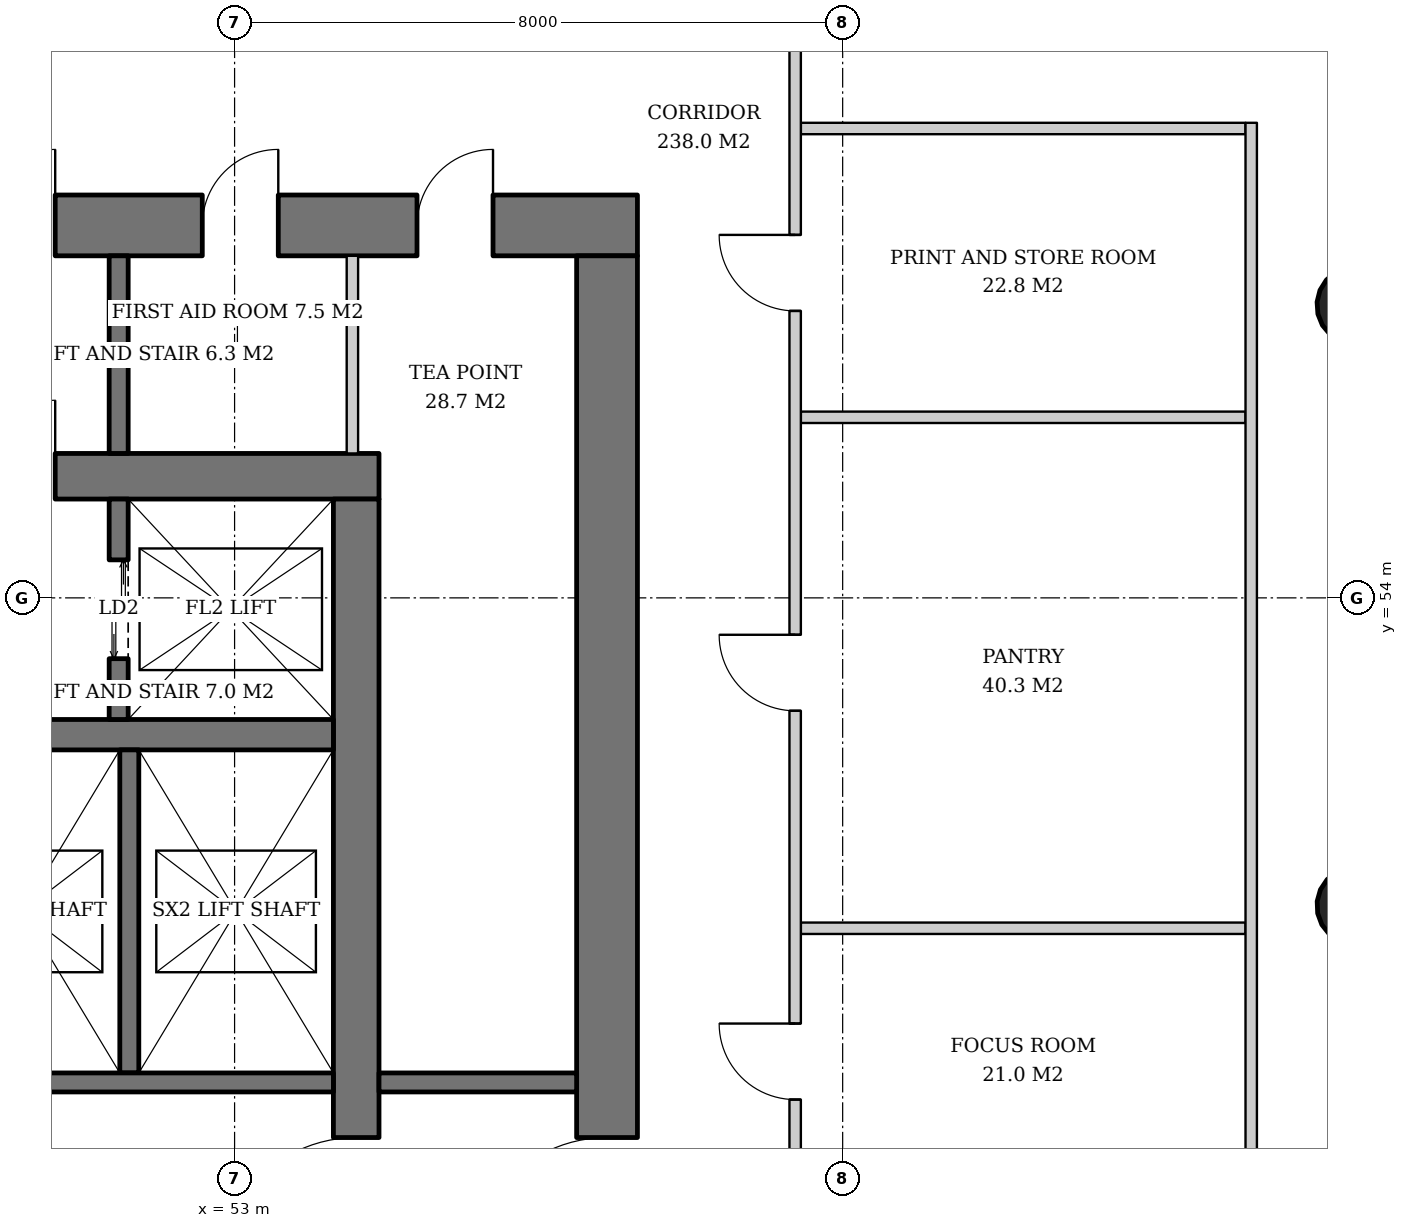
"""IFC4 building model, lengths in metres.
Left out: names, types, materials, properties, quantities, classifications, styles, units other than length and angle.
Written with IfcOpenShell. Run it as: python <this file> out.ifc"""

import sys

from ifc_helpers import new_model, si_unit, direction, frame, frame_2d, origin, origin_2d, place, context, subcontext, project, spatial, rectangle, hollow_circle, extrude, element, fill, save


model = new_model("IFC4")
c1 = context("Model", 3, precision=1e-05, world=origin(), true_north=direction((0.0, 1.0)))
c2 = subcontext(c1, "Body", "Model", "MODEL_VIEW")
j1 = project(units=[si_unit("LENGTHUNIT", "METRE"), si_unit("PLANEANGLEUNIT", "RADIAN")], contexts=[c1])
p1 = place(None, origin())
s1 = spatial("IfcSite", under=j1, at=p1, CompositionType="ELEMENT")
p2 = place(p1, origin())
s2 = spatial("IfcBuilding", under=s1, at=p2, CompositionType="ELEMENT")
p3 = place(p2, frame((0.0, 0.0, 59.0)))
s3 = spatial("IfcBuildingStorey", under=s2, at=p3, CompositionType="ELEMENT", Elevation=59.0)
p4 = place(p3, frame((67.786, 49.957, 0.0), z_axis=(-0.031913703469, -0.006357055621, 0.999470411455), x_axis=(0.195357113251, -0.980732174603, 0.0)))
e1 = element("IfcColumn", 1, at=p4, inside=s3, PredefinedType="COLUMN", context=c2, shape_type="SweptSolid", body=[
    extrude(hollow_circle(Radius=0.508, WallThickness=0.04, at=origin_2d()), origin(), (0.0, 0.0, 1.0), 3.802),
])
p5 = place(p3, frame((67.786, 57.871, 0.0), z_axis=(-0.031908506785, -0.019132263625, 0.999307662176), x_axis=(0.514241961696, -0.857645150882, 0.0)))
e2 = element("IfcColumn", 2, at=p5, inside=s3, PredefinedType="COLUMN", context=c2, shape_type="SweptSolid", body=[
    extrude(hollow_circle(Radius=0.508, WallThickness=0.04, at=origin_2d()), origin(), (0.0, 0.0, 1.0), 3.803),
])
p6 = place(p3, frame((35.1, 55.6, 0.0), z_axis=(0.0, 0.0, 1.0), x_axis=(1.0, 0.0, 0.0)))
e3 = element("IfcWall", 3, at=p6, inside=s3, PredefinedType="SHEAR", context=c2, shape_type="SweptSolid", body=[
    extrude(rectangle(XDim=19.8, YDim=0.6, at=frame_2d((9.9, 0.0))), origin(), (0.0, 0.0, 1.0), 3.8),
])
p7 = place(p6, frame((14.54, 0.0, 0.0)))
e4 = element("IfcOpeningElement", 4, at=p7, cuts=e3, PredefinedType="OPENING", context=c2, shape_type="SweptSolid", body=[
    extrude(rectangle(XDim=1.0, YDim=2.1, at=frame_2d((0.5, 1.05))), frame((0.0, 0.31, 0.0), z_axis=(0.0, -1.0, 0.0), x_axis=(1.0, 0.0, 0.0)), (0.0, 0.0, 1.0), 0.62),
])
p8 = place(p6, frame((2.425, 0.0, 0.0)))
e5 = element("IfcOpeningElement", 5, at=p8, cuts=e3, PredefinedType="OPENING", context=c2, shape_type="SweptSolid", body=[
    extrude(rectangle(XDim=1.0, YDim=2.1, at=frame_2d((0.5, 1.05))), frame((0.0, 0.31, 0.0), z_axis=(0.0, -1.0, 0.0), x_axis=(1.0, 0.0, 0.0)), (0.0, 0.0, 1.0), 0.62),
])
p9 = place(p3, frame((54.6, 36.7, 0.0), z_axis=(0.0, 0.0, 1.0), x_axis=(0.0, 1.0, 0.0)))
e6 = element("IfcWall", 6, at=p9, inside=s3, PredefinedType="SHEAR", context=c2, shape_type="SweptSolid", body=[
    extrude(rectangle(XDim=18.6, YDim=0.6, at=frame_2d((9.3, 0.0))), origin(), (0.0, 0.0, 1.0), 3.8),
])
p10 = place(p9, frame((8.4, 0.0, 0.0)))
e7 = element("IfcOpeningElement", 7, at=p10, cuts=e6, PredefinedType="OPENING", context=c2, shape_type="SweptSolid", body=[
    extrude(rectangle(XDim=1.8, YDim=2.4, at=frame_2d((0.9, 1.2))), frame((0.0, 0.31, 0.0), z_axis=(0.0, -1.0, 0.0), x_axis=(1.0, 0.0, 0.0)), (0.0, 0.0, 1.0), 0.62),
])
p11 = place(p3, frame((31.7, 58.9, 0.0), z_axis=(0.0, 0.0, 1.0), x_axis=(1.0, 0.0, 0.0)))
e8 = element("IfcWall", 8, at=p11, inside=s3, PredefinedType="SHEAR", context=c2, shape_type="SweptSolid", body=[
    extrude(rectangle(XDim=26.6, YDim=0.8, at=frame_2d((13.3, 0.0))), origin(), (0.0, 0.0, 1.0), 3.8),
])
p12 = place(p11, frame((17.94, 0.0, 0.0)))
e9 = element("IfcOpeningElement", 9, at=p12, cuts=e8, PredefinedType="OPENING", context=c2, shape_type="SweptSolid", body=[
    extrude(rectangle(XDim=1.0, YDim=2.1, at=frame_2d((0.5, 1.05))), frame((0.0, 0.41, 0.0), z_axis=(0.0, -1.0, 0.0), x_axis=(1.0, 0.0, 0.0)), (0.0, 0.0, 1.0), 0.82),
])
p13 = place(p11, frame((5.825, 0.0, 0.0)))
e10 = element("IfcOpeningElement", 10, at=p13, cuts=e8, PredefinedType="OPENING", context=c2, shape_type="SweptSolid", body=[
    extrude(rectangle(XDim=1.0, YDim=2.1, at=frame_2d((0.5, 1.05))), frame((0.0, 0.41, 0.0), z_axis=(0.0, -1.0, 0.0), x_axis=(1.0, 0.0, 0.0)), (0.0, 0.0, 1.0), 0.82),
])
p14 = place(p11, frame((1.607, 0.0, 0.0)))
e11 = element("IfcOpeningElement", 11, at=p14, cuts=e8, PredefinedType="OPENING", context=c2, shape_type="SweptSolid", body=[
    extrude(rectangle(XDim=1.0, YDim=2.1, at=frame_2d((0.5, 1.05))), frame((0.0, 0.41, 0.0), z_axis=(0.0, -1.0, 0.0), x_axis=(1.0, 0.0, 0.0)), (0.0, 0.0, 1.0), 0.82),
])
p15 = place(p11, frame((3.666, 0.0, 0.0)))
e12 = element("IfcOpeningElement", 12, at=p15, cuts=e8, PredefinedType="OPENING", context=c2, shape_type="SweptSolid", body=[
    extrude(rectangle(XDim=1.0, YDim=2.1, at=frame_2d((0.5, 1.05))), frame((0.0, 0.41, 0.0), z_axis=(0.0, -1.0, 0.0), x_axis=(1.0, 0.0, 0.0)), (0.0, 0.0, 1.0), 0.82),
])
p16 = place(p11, frame((8.342, 0.0, 0.0)))
e13 = element("IfcOpeningElement", 13, at=p16, cuts=e8, PredefinedType="OPENING", context=c2, shape_type="SweptSolid", body=[
    extrude(rectangle(XDim=1.0, YDim=2.1, at=frame_2d((0.5, 1.05))), frame((0.0, 0.41, 0.0), z_axis=(0.0, -1.0, 0.0), x_axis=(1.0, 0.0, 0.0)), (0.0, 0.0, 1.0), 0.82),
])
p17 = place(p11, frame((11.626, 0.0, 0.0)))
e14 = element("IfcOpeningElement", 14, at=p17, cuts=e8, PredefinedType="OPENING", context=c2, shape_type="SweptSolid", body=[
    extrude(rectangle(XDim=1.0, YDim=2.1, at=frame_2d((0.5, 1.05))), frame((0.0, 0.41, 0.0), z_axis=(0.0, -1.0, 0.0), x_axis=(1.0, 0.0, 0.0)), (0.0, 0.0, 1.0), 0.82),
])
p18 = place(p11, frame((14.862, 0.0, 0.0)))
e15 = element("IfcOpeningElement", 15, at=p18, cuts=e8, PredefinedType="OPENING", context=c2, shape_type="SweptSolid", body=[
    extrude(rectangle(XDim=1.0, YDim=2.1, at=frame_2d((0.5, 1.05))), frame((0.0, 0.41, 0.0), z_axis=(0.0, -1.0, 0.0), x_axis=(1.0, 0.0, 0.0)), (0.0, 0.0, 1.0), 0.82),
])
p19 = place(p11, frame((20.875, 0.0, 0.0)))
e16 = element("IfcOpeningElement", 16, at=p19, cuts=e8, PredefinedType="OPENING", context=c2, shape_type="SweptSolid", body=[
    extrude(rectangle(XDim=1.0, YDim=2.1, at=frame_2d((0.5, 1.05))), frame((0.0, 0.41, 0.0), z_axis=(0.0, -1.0, 0.0), x_axis=(1.0, 0.0, 0.0)), (0.0, 0.0, 1.0), 0.82),
])
p20 = place(p11, frame((23.7, 0.0, 0.0)))
e17 = element("IfcOpeningElement", 17, at=p20, cuts=e8, PredefinedType="OPENING", context=c2, shape_type="SweptSolid", body=[
    extrude(rectangle(XDim=1.0, YDim=2.1, at=frame_2d((0.5, 1.05))), frame((0.0, 0.41, 0.0), z_axis=(0.0, -1.0, 0.0), x_axis=(1.0, 0.0, 0.0)), (0.0, 0.0, 1.0), 0.82),
])
p21 = place(p3, frame((57.9, 33.5, 0.0), z_axis=(0.0, 0.0, 1.0), x_axis=(0.0, 1.0, 0.0)))
e18 = element("IfcWall", 18, at=p21, inside=s3, PredefinedType="SHEAR", context=c2, shape_type="SweptSolid", body=[
    extrude(rectangle(XDim=25.0, YDim=0.8, at=frame_2d((12.5, 0.0))), origin(), (0.0, 0.0, 1.0), 3.8),
])
p22 = place(p21, frame((11.6, 0.0, 0.0)))
e19 = element("IfcOpeningElement", 19, at=p22, cuts=e18, PredefinedType="OPENING", context=c2, shape_type="SweptSolid", body=[
    extrude(rectangle(XDim=1.8, YDim=2.4, at=frame_2d((0.9, 1.2))), frame((0.0, 0.41, 0.0), z_axis=(0.0, -1.0, 0.0), x_axis=(1.0, 0.0, 0.0)), (0.0, 0.0, 1.0), 0.82),
])
p23 = place(p3, frame((35.7, 52.2, 0.0), z_axis=(0.0, 0.0, 1.0), x_axis=(1.0, 0.0, 0.0)))
e20 = element("IfcWall", 20, at=p23, inside=s3, PredefinedType="SHEAR", context=c2, shape_type="SweptSolid", body=[
    extrude(rectangle(XDim=18.6, YDim=0.4, at=frame_2d((9.3, 0.0))), origin(), (0.0, 0.0, 1.0), 3.8),
])
p24 = place(p3, frame((51.475, 52.4, 0.0), z_axis=(0.0, 0.0, 1.0), x_axis=(0.0, 1.0, 0.0)))
e21 = element("IfcWall", 21, at=p24, inside=s3, PredefinedType="SHEAR", context=c2, shape_type="SweptSolid", body=[
    extrude(rectangle(XDim=2.9, YDim=0.25, at=frame_2d((1.45, 0.0))), origin(), (0.0, 0.0, 1.0), 3.8),
])
p25 = place(p24, frame((0.8, 0.0, 0.0)))
e22 = element("IfcOpeningElement", 22, at=p25, cuts=e21, PredefinedType="OPENING", context=c2, shape_type="SweptSolid", body=[
    extrude(rectangle(XDim=1.3, YDim=2.2, at=frame_2d((0.65, 1.1))), frame((0.0, 0.135, 0.0), z_axis=(0.0, -1.0, 0.0), x_axis=(1.0, 0.0, 0.0)), (0.0, 0.0, 1.0), 0.27),
])
p26 = place(p3, frame((51.615, 47.75, 0.0), z_axis=(0.0, 0.0, 1.0), x_axis=(0.0, 1.0, 0.0)))
e23 = element("IfcWall", 23, at=p26, inside=s3, PredefinedType="SHEAR", context=c2, shape_type="SweptSolid", body=[
    extrude(rectangle(XDim=4.25, YDim=0.25, at=frame_2d((2.125, 0.0))), origin(), (0.0, 0.0, 1.0), 3.8),
])
p27 = place(p3, frame((48.93, 47.625, 0.0), z_axis=(0.0, 0.0, 1.0), x_axis=(1.0, 0.0, 0.0)))
e24 = element("IfcWall", 24, at=p27, inside=s3, PredefinedType="SHEAR", context=c2, shape_type="SweptSolid", body=[
    extrude(rectangle(XDim=5.37, YDim=0.25, at=frame_2d((2.685, 0.0))), origin(), (0.0, 0.0, 1.0), 3.8),
])
for number, where, z_axis, x_axis in (
    (25, (51.475, 55.9, 0.0), (0.0, 0.0, 1.0), (0.0, 1.0, 0.0)),
    (26, (54.9, 47.625, 0.0), (0.0, 0.0, 1.0), (1.0, 0.0, 0.0)),
):
    element("IfcWall", number, at=place(p3, frame(where, z_axis=z_axis, x_axis=x_axis)), inside=s3, PredefinedType="SOLIDWALL", context=c2, shape_type="SweptSolid", body=[
        extrude(rectangle(XDim=2.6, YDim=0.25, at=frame_2d((1.3, 0.0))), origin(), (0.0, 0.0, 1.0), 3.62),
    ])
p28 = place(p3, frame((54.55, 55.9, 0.0), z_axis=(0.0, 0.0, 1.0), x_axis=(0.0, 1.0, 0.0)))
e27 = element("IfcWall", 27, at=p28, inside=s3, PredefinedType="SOLIDWALL", context=c2, shape_type="SweptSolid", body=[
    extrude(rectangle(XDim=2.6, YDim=0.15, at=frame_2d((1.3, 0.0))), origin(), (0.0, 0.0, 1.0), 3.62),
])
for number, where, z_axis, x_axis in (
    (28, (60.45, 49.653, 0.0), (0.0, 0.0, 1.0), (1.0, 0.0, 0.0)),
    (29, (60.45, 56.375, 0.0), (0.0, 0.0, 1.0), (1.0, 0.0, 0.0)),
):
    element("IfcWall", number, at=place(p3, frame(where, z_axis=z_axis, x_axis=x_axis)), inside=s3, PredefinedType="PARTITIONING", context=c2, shape_type="SweptSolid", body=[
        extrude(rectangle(XDim=5.85, YDim=0.15, at=frame_2d((2.925, 0.0))), origin(), (0.0, 0.0, 1.0), 3.62),
    ])
p29 = place(p3, frame((60.45, 60.175, 0.0), z_axis=(0.0, 0.0, 1.0), x_axis=(1.0, 0.0, 0.0)))
e30 = element("IfcWall", 30, at=p29, inside=s3, PredefinedType="PARTITIONING", context=c2, shape_type="SweptSolid", body=[
    extrude(rectangle(XDim=5.85, YDim=0.15, at=frame_2d((2.925, 0.0))), origin(), (0.0, 0.0, 1.0), 2.806),
])
p30 = place(p3, frame((66.375, 31.75, 0.0), z_axis=(0.0, 0.0, 1.0), x_axis=(0.0, 1.0, 0.0)))
e31 = element("IfcWall", 31, at=p30, inside=s3, PredefinedType="PARTITIONING", context=c2, shape_type="SweptSolid", body=[
    extrude(rectangle(XDim=28.5, YDim=0.15, at=frame_2d((14.25, 0.0))), origin(), (0.0, 0.0, 1.0), 2.612),
])
p31 = place(p3, frame((60.375, 30.55, 0.0), z_axis=(0.0, 0.0, 1.0), x_axis=(0.0, 1.0, 0.0)))
e32 = element("IfcWall", 32, at=p31, inside=s3, PredefinedType="PARTITIONING", context=c2, shape_type="SweptSolid", body=[
    extrude(rectangle(XDim=30.75, YDim=0.15, at=frame_2d((15.375, 0.0))), origin(), (0.0, 0.0, 1.0), 2.612),
])
p32 = place(p31, frame((4.428, 0.0, 0.0)))
e33 = element("IfcOpeningElement", 33, at=p32, cuts=e32, PredefinedType="OPENING", context=c2, shape_type="SweptSolid", body=[
    extrude(rectangle(XDim=1.0, YDim=2.1, at=frame_2d((0.5, 1.05))), frame((0.0, 0.085, 0.0), z_axis=(0.0, -1.0, 0.0), x_axis=(1.0, 0.0, 0.0)), (0.0, 0.0, 1.0), 0.17),
])
p33 = place(p31, frame((9.835, 0.0, 0.0)))
e34 = element("IfcOpeningElement", 34, at=p33, cuts=e32, PredefinedType="OPENING", context=c2, shape_type="SweptSolid", body=[
    extrude(rectangle(XDim=1.0, YDim=2.1, at=frame_2d((0.5, 1.05))), frame((0.0, 0.085, 0.0), z_axis=(0.0, -1.0, 0.0), x_axis=(1.0, 0.0, 0.0)), (0.0, 0.0, 1.0), 0.17),
])
p34 = place(p31, frame((13.343, 0.0, 0.0)))
e35 = element("IfcOpeningElement", 35, at=p34, cuts=e32, PredefinedType="OPENING", context=c2, shape_type="SweptSolid", body=[
    extrude(rectangle(XDim=1.0, YDim=2.1, at=frame_2d((0.5, 1.05))), frame((0.0, 0.085, 0.0), z_axis=(0.0, -1.0, 0.0), x_axis=(1.0, 0.0, 0.0)), (0.0, 0.0, 1.0), 0.17),
])
p35 = place(p31, frame((16.85, 0.0, 0.0)))
e36 = element("IfcOpeningElement", 36, at=p35, cuts=e32, PredefinedType="OPENING", context=c2, shape_type="SweptSolid", body=[
    extrude(rectangle(XDim=1.0, YDim=2.1, at=frame_2d((0.5, 1.05))), frame((0.0, 0.085, 0.0), z_axis=(0.0, -1.0, 0.0), x_axis=(1.0, 0.0, 0.0)), (0.0, 0.0, 1.0), 0.17),
])
p36 = place(p31, frame((21.964, 0.0, 0.0)))
e37 = element("IfcOpeningElement", 37, at=p36, cuts=e32, PredefinedType="OPENING", context=c2, shape_type="SweptSolid", body=[
    extrude(rectangle(XDim=1.0, YDim=2.1, at=frame_2d((0.5, 1.05))), frame((0.0, 0.085, 0.0), z_axis=(0.0, -1.0, 0.0), x_axis=(1.0, 0.0, 0.0)), (0.0, 0.0, 1.0), 0.17),
])
p37 = place(p31, frame((27.225, 0.0, 0.0)))
e38 = element("IfcOpeningElement", 38, at=p37, cuts=e32, PredefinedType="OPENING", context=c2, shape_type="SweptSolid", body=[
    extrude(rectangle(XDim=1.0, YDim=2.1, at=frame_2d((0.5, 1.05))), frame((0.0, 0.085, 0.0), z_axis=(0.0, -1.0, 0.0), x_axis=(1.0, 0.0, 0.0)), (0.0, 0.0, 1.0), 0.17),
])
p38 = place(p25, origin())
e39 = element("IfcDoor", 39, at=p38, inside=s3, OperationType="DOUBLE_DOOR_SLIDING", PredefinedType="DOOR", context=c2, shape_type="SweptSolid", body=[
    extrude(rectangle(XDim=1.3, YDim=2.2, at=frame_2d((0.65, 1.1))), frame((0.0, 0.025, 0.0), z_axis=(0.0, -1.0, 0.0), x_axis=(1.0, 0.0, 0.0)), (0.0, 0.0, 1.0), 0.05),
])
fill(e22, e39)
p39 = place(p7, origin())
e40 = element("IfcDoor", 40, at=p39, inside=s3, OperationType="SINGLE_SWING_RIGHT", PredefinedType="DOOR", context=c2, shape_type="SweptSolid", body=[
    extrude(rectangle(XDim=1.0, YDim=2.1, at=frame_2d((0.5, 1.05))), frame((0.0, 0.025, 0.0), z_axis=(0.0, -1.0, 0.0), x_axis=(1.0, 0.0, 0.0)), (0.0, 0.0, 1.0), 0.05),
])
fill(e4, e40)
p40 = place(p10, origin())
e41 = element("IfcDoor", 41, at=p40, inside=s3, OperationType="DOUBLE_DOOR_SINGLE_SWING", PredefinedType="DOOR", context=c2, shape_type="SweptSolid", body=[
    extrude(rectangle(XDim=1.8, YDim=2.4, at=frame_2d((0.9, 1.2))), frame((0.0, 0.025, 0.0), z_axis=(0.0, -1.0, 0.0), x_axis=(1.0, 0.0, 0.0)), (0.0, 0.0, 1.0), 0.05),
])
fill(e7, e41)
p41 = place(p22, origin())
e42 = element("IfcDoor", 42, at=p41, inside=s3, OperationType="DOUBLE_DOOR_SINGLE_SWING", PredefinedType="DOOR", context=c2, shape_type="SweptSolid", body=[
    extrude(rectangle(XDim=1.8, YDim=2.4, at=frame_2d((0.9, 1.2))), frame((0.0, 0.025, 0.0), z_axis=(0.0, -1.0, 0.0), x_axis=(1.0, 0.0, 0.0)), (0.0, 0.0, 1.0), 0.05),
])
fill(e19, e42)
p42 = place(p12, origin())
e43 = element("IfcDoor", 43, at=p42, inside=s3, OperationType="SINGLE_SWING_RIGHT", PredefinedType="DOOR", context=c2, shape_type="SweptSolid", body=[
    extrude(rectangle(XDim=1.0, YDim=2.1, at=frame_2d((0.5, 1.05))), frame((0.0, 0.025, 0.0), z_axis=(0.0, -1.0, 0.0), x_axis=(1.0, 0.0, 0.0)), (0.0, 0.0, 1.0), 0.05),
])
fill(e9, e43)
p43 = place(p19, origin())
e44 = element("IfcDoor", 44, at=p43, inside=s3, OperationType="SINGLE_SWING_RIGHT", PredefinedType="DOOR", context=c2, shape_type="SweptSolid", body=[
    extrude(rectangle(XDim=1.0, YDim=2.1, at=frame_2d((0.5, 1.05))), frame((0.0, -0.34, 0.0), z_axis=(0.0, -1.0, 0.0), x_axis=(1.0, 0.0, 0.0)), (0.0, 0.0, 1.0), 0.05),
])
fill(e16, e44)
p44 = place(p20, origin())
e45 = element("IfcDoor", 45, at=p44, inside=s3, OperationType="SINGLE_SWING_RIGHT", PredefinedType="DOOR", context=c2, shape_type="SweptSolid", body=[
    extrude(rectangle(XDim=1.0, YDim=2.1, at=frame_2d((0.5, 1.05))), frame((0.0, -0.34, 0.0), z_axis=(0.0, -1.0, 0.0), x_axis=(1.0, 0.0, 0.0)), (0.0, 0.0, 1.0), 0.05),
])
fill(e17, e45)
p45 = place(p35, origin())
e46 = element("IfcDoor", 46, at=p45, inside=s3, OperationType="SINGLE_SWING_RIGHT", PredefinedType="DOOR", context=c2, shape_type="SweptSolid", body=[
    extrude(rectangle(XDim=1.0, YDim=2.1, at=frame_2d((0.5, 1.05))), frame((0.0, 0.025, 0.0), z_axis=(0.0, -1.0, 0.0), x_axis=(1.0, 0.0, 0.0)), (0.0, 0.0, 1.0), 0.05),
])
fill(e36, e46)
p46 = place(p36, origin())
e47 = element("IfcDoor", 47, at=p46, inside=s3, OperationType="SINGLE_SWING_RIGHT", PredefinedType="DOOR", context=c2, shape_type="SweptSolid", body=[
    extrude(rectangle(XDim=1.0, YDim=2.1, at=frame_2d((0.5, 1.05))), frame((0.0, 0.025, 0.0), z_axis=(0.0, -1.0, 0.0), x_axis=(1.0, 0.0, 0.0)), (0.0, 0.0, 1.0), 0.05),
])
fill(e37, e47)
p47 = place(p37, origin())
e48 = element("IfcDoor", 48, at=p47, inside=s3, OperationType="SINGLE_SWING_RIGHT", PredefinedType="DOOR", context=c2, shape_type="SweptSolid", body=[
    extrude(rectangle(XDim=1.0, YDim=2.1, at=frame_2d((0.5, 1.05))), frame((0.0, 0.025, 0.0), z_axis=(0.0, -1.0, 0.0), x_axis=(1.0, 0.0, 0.0)), (0.0, 0.0, 1.0), 0.05),
])
fill(e38, e48)
save(model, sys.argv[1])
